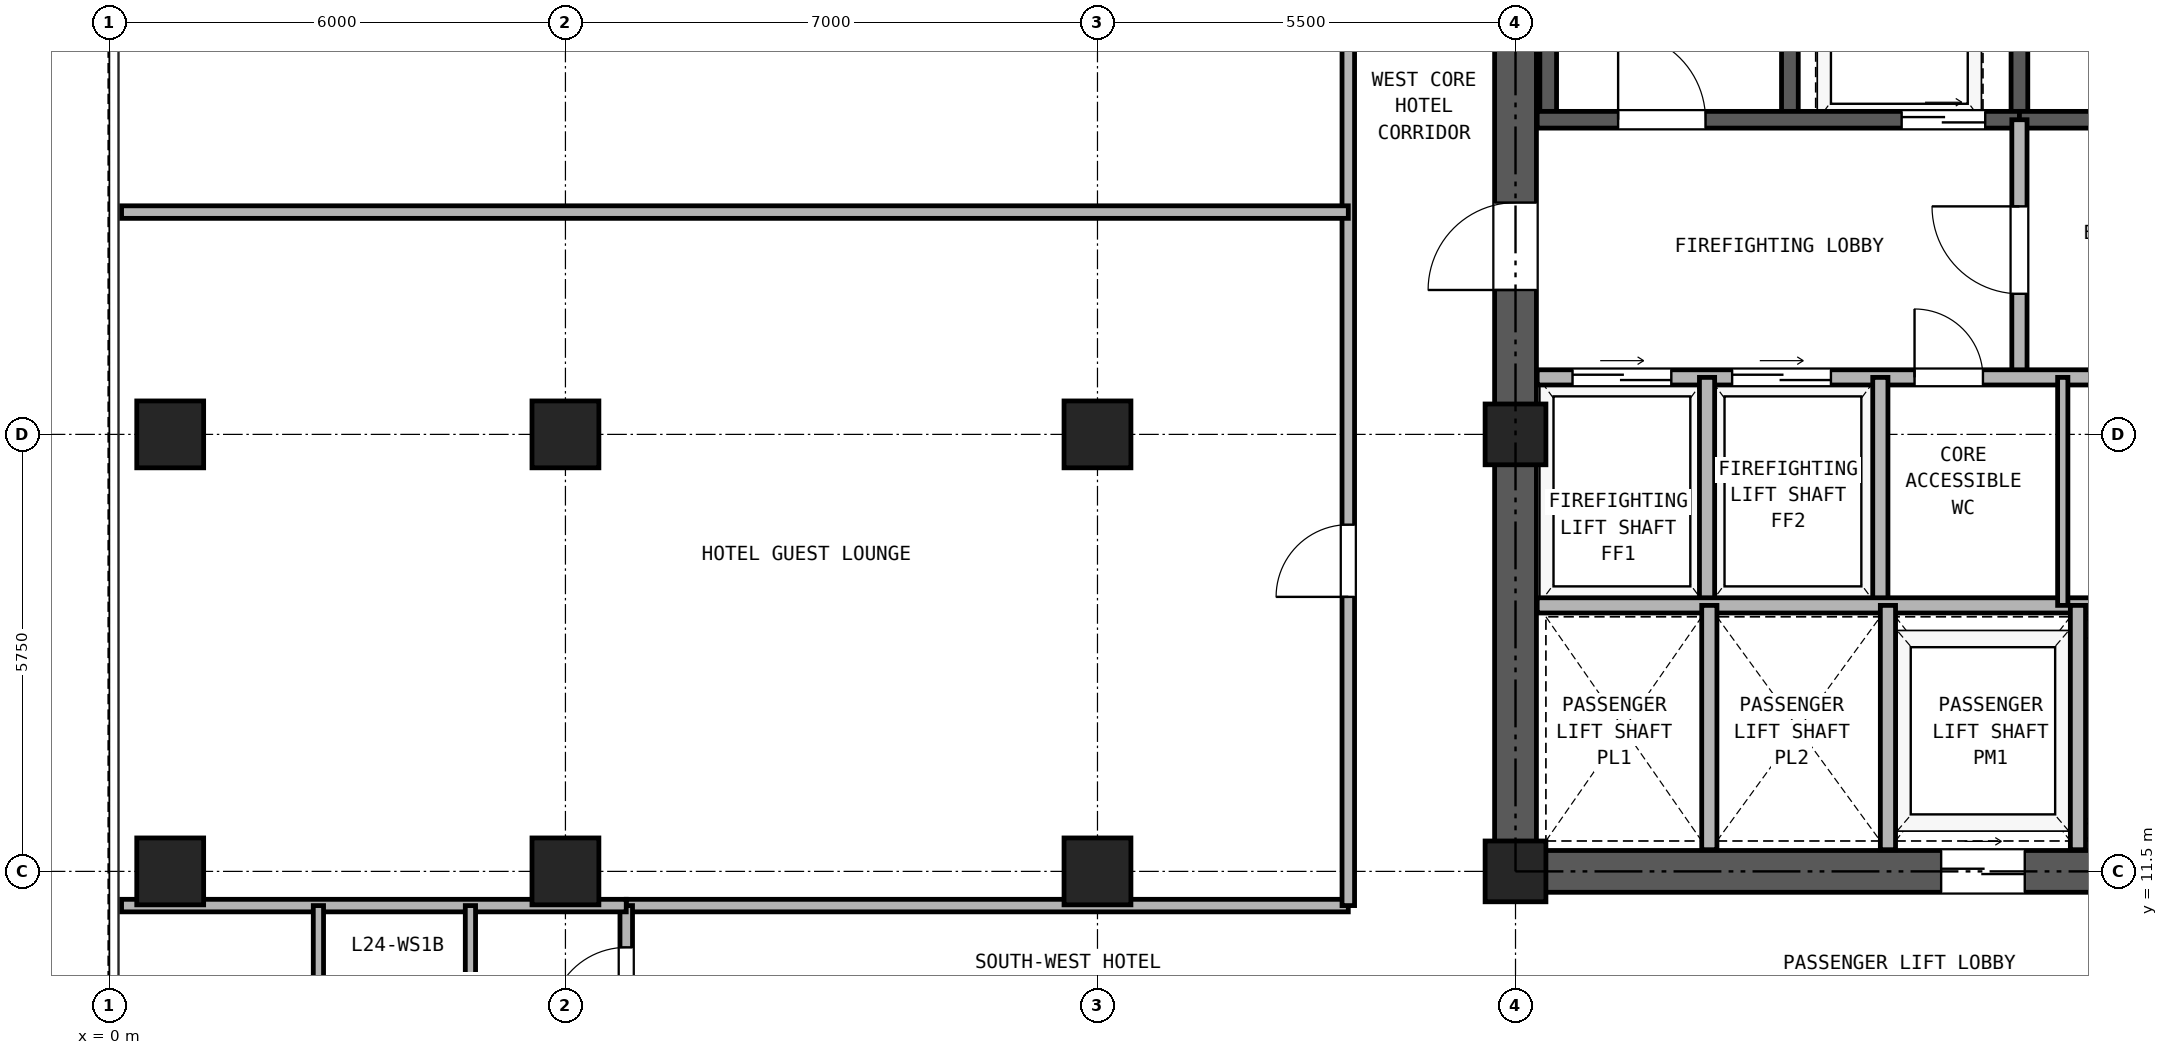
"""IFC4 building model, lengths in metres.
Left out: names, types, materials, properties, quantities, classifications, styles, units other than length and angle.
Written with IfcOpenShell. Run it as: python <this file> out.ifc"""

import sys

from ifc_helpers import new_model, si_unit, direction, frame, frame_2d, origin, origin_2d, place, context, subcontext, project, spatial, rectangle, hollow_rectangle, extrude, source, transform, mapped, element, fill, save


model = new_model("IFC4")
c1 = context("Model", 3, precision=1e-05, world=origin(), true_north=direction((0.0, 1.0)))
c2 = subcontext(c1, "Body", "Model", "MODEL_VIEW")
j1 = project(units=[si_unit("LENGTHUNIT", "METRE"), si_unit("PLANEANGLEUNIT", "RADIAN")], contexts=[c1])
p1 = place(None, origin())
s1 = spatial("IfcSite", under=j1, at=p1, CompositionType="ELEMENT")
p2 = place(p1, origin())
s2 = spatial("IfcBuilding", under=s1, at=p2, CompositionType="ELEMENT")
p3 = place(p2, frame((0.0, 0.0, 92.7)))
s3 = spatial("IfcBuildingStorey", under=s2, at=p3, CompositionType="ELEMENT", Elevation=92.7)
m1 = source(origin(), c2, "Body", "SweptSolid", [
    extrude(hollow_rectangle(XDim=0.88, YDim=0.88, WallThickness=0.05, at=origin_2d()), origin(), (0.0, 0.0, 1.0), 2.95),
])
for number, where, z_axis, x_axis in (
    (1, (0.8, 11.5, 0.0), (0.0, 0.0, 1.0), (1.0, 0.0, 0.0)),
    (2, (0.8, 17.25, 0.0), (0.0, 0.0, 1.0), (1.0, 0.0, 0.0)),
    (3, (6.0, 11.5, 0.0), (0.0, 0.0, 1.0), (1.0, 0.0, 0.0)),
    (4, (6.0, 17.25, 0.0), (0.0, 0.0, 1.0), (1.0, 0.0, 0.0)),
    (5, (13.0, 11.5, 0.0), (0.0, 0.0, 1.0), (1.0, 0.0, 0.0)),
    (6, (13.0, 17.25, 0.0), (0.0, 0.0, 1.0), (1.0, 0.0, 0.0)),
):
    element("IfcColumn", number, at=place(p3, frame(where, z_axis=z_axis, x_axis=x_axis)), inside=s3, PredefinedType="COLUMN", context=c2, shape_type="MappedRepresentation", body=[
        mapped(m1, transform((0.0, 0.0, 0.0), x_axis=(1.0, 0.0, 0.0), y_axis=(0.0, 1.0, 0.0), z_axis=(0.0, 0.0, 1.0), scale=1.0)),
    ])
m2 = source(origin(), c2, "Body", "SweptSolid", [
    extrude(hollow_rectangle(XDim=0.8, YDim=0.8, WallThickness=0.045, at=origin_2d()), origin(), (0.0, 0.0, 1.0), 2.95),
])
for number, where, z_axis, x_axis in (
    (7, (18.5, 11.5, 0.0), (0.0, 0.0, 1.0), (1.0, 0.0, 0.0)),
    (8, (18.5, 17.25, 0.0), (0.0, 0.0, 1.0), (1.0, 0.0, 0.0)),
):
    element("IfcColumn", number, at=place(p3, frame(where, z_axis=z_axis, x_axis=x_axis)), inside=s3, PredefinedType="COLUMN", context=c2, shape_type="MappedRepresentation", body=[
        mapped(m2, transform((0.0, 0.0, 0.0), x_axis=(1.0, 0.0, 0.0), y_axis=(0.0, 1.0, 0.0), z_axis=(0.0, 0.0, 1.0), scale=1.0)),
    ])
p4 = place(p3, frame((18.225, 11.5, 0.0), z_axis=(0.0, 0.0, 1.0), x_axis=(1.0, 0.0, 0.0)))
e9 = element("IfcWall", 9, at=p4, inside=s3, PredefinedType="SHEAR", context=c2, shape_type="SweptSolid", body=[
    extrude(rectangle(XDim=10.55, YDim=0.55, at=frame_2d((5.275, 0.0))), origin(), (0.0, 0.0, 1.0), 2.95),
])
p5 = place(p4, frame((5.875, 0.0, 0.0)))
e10 = element("IfcOpeningElement", 10, at=p5, cuts=e9, PredefinedType="OPENING", context=c2, shape_type="SweptSolid", body=[
    extrude(rectangle(XDim=1.1, YDim=2.25, at=frame_2d((0.55, 1.125))), frame((0.0, 0.285, 0.0), z_axis=(0.0, -1.0, 0.0), x_axis=(1.0, 0.0, 0.0)), (0.0, 0.0, 1.0), 0.57),
])
p6 = place(p4, frame((8.275, 0.0, 0.0)))
e11 = element("IfcOpeningElement", 11, at=p6, cuts=e9, PredefinedType="OPENING", context=c2, shape_type="SweptSolid", body=[
    extrude(rectangle(XDim=1.1, YDim=2.25, at=frame_2d((0.55, 1.125))), frame((0.0, 0.285, 0.0), z_axis=(0.0, -1.0, 0.0), x_axis=(1.0, 0.0, 0.0)), (0.0, 0.0, 1.0), 0.57),
])
p7 = place(p3, frame((18.5, 11.775, 0.0), z_axis=(0.0, 0.0, 1.0), x_axis=(0.0, 1.0, 0.0)))
e12 = element("IfcWall", 12, at=p7, inside=s3, PredefinedType="SHEAR", context=c2, shape_type="SweptSolid", body=[
    extrude(rectangle(XDim=16.7, YDim=0.55, at=frame_2d((8.35, 0.0))), origin(), (0.0, 0.0, 1.0), 2.95),
])
p8 = place(p7, frame((7.375, 0.0, 0.0)))
e13 = element("IfcOpeningElement", 13, at=p8, cuts=e12, PredefinedType="OPENING", context=c2, shape_type="SweptSolid", body=[
    extrude(rectangle(XDim=1.15, YDim=2.2, at=frame_2d((0.575, 1.1))), frame((0.0, 0.285, 0.0), z_axis=(0.0, -1.0, 0.0), x_axis=(1.0, 0.0, 0.0)), (0.0, 0.0, 1.0), 0.57),
])
for number, where, z_axis, x_axis in (
    (14, (18.93, 21.39, 0.0), (0.0, 0.0, 1.0), (0.0, 1.0, 0.0)),
    (15, (22.11, 21.39, 0.0), (0.0, 0.0, 1.0), (0.0, 1.0, 0.0)),
    (16, (25.13, 21.39, 0.0), (0.0, 0.0, 1.0), (0.0, 1.0, 0.0)),
):
    element("IfcWall", number, at=place(p3, frame(where, z_axis=z_axis, x_axis=x_axis)), inside=s3, PredefinedType="SOLIDWALL", context=c2, shape_type="SweptSolid", body=[
        extrude(rectangle(XDim=7.11, YDim=0.22, at=frame_2d((3.555, 0.0))), origin(), (0.0, 0.0, 1.0), 2.95),
    ])
p9 = place(p3, frame((18.785, 21.39, 0.0), z_axis=(0.0, 0.0, 1.0), x_axis=(1.0, 0.0, 0.0)))
e17 = element("IfcWall", 17, at=p9, inside=s3, PredefinedType="SOLIDWALL", context=c2, shape_type="SweptSolid", body=[
    extrude(rectangle(XDim=6.345, YDim=0.22, at=frame_2d((3.172, 0.0))), origin(), (0.0, 0.0, 1.0), 2.95),
])
p10 = place(p9, frame((1.065, 0.0, 0.0)))
e18 = element("IfcOpeningElement", 18, at=p10, cuts=e17, PredefinedType="OPENING", context=c2, shape_type="SweptSolid", body=[
    extrude(rectangle(XDim=1.15, YDim=2.2, at=frame_2d((0.575, 1.1))), frame((0.0, 0.12, 0.0), z_axis=(0.0, -1.0, 0.0), x_axis=(1.0, 0.0, 0.0)), (0.0, 0.0, 1.0), 0.24),
])
p11 = place(p9, frame((4.795, 0.0, 0.0)))
e19 = element("IfcOpeningElement", 19, at=p11, cuts=e17, PredefinedType="OPENING", context=c2, shape_type="SweptSolid", body=[
    extrude(rectangle(XDim=1.1, YDim=2.25, at=frame_2d((0.55, 1.125))), frame((0.0, 0.12, 0.0), z_axis=(0.0, -1.0, 0.0), x_axis=(1.0, 0.0, 0.0)), (0.0, 0.0, 1.0), 0.24),
])
p12 = place(p3, frame((25.13, 21.39, 0.0), z_axis=(0.0, 0.0, 1.0), x_axis=(1.0, 0.0, 0.0)))
e20 = element("IfcWall", 20, at=p12, inside=s3, PredefinedType="SOLIDWALL", context=c2, shape_type="SweptSolid", body=[
    extrude(rectangle(XDim=3.085, YDim=0.22, at=frame_2d((1.542, 0.0))), origin(), (0.0, 0.0, 1.0), 2.95),
])
p13 = place(p12, frame((0.92, 0.0, 0.0)))
e21 = element("IfcOpeningElement", 21, at=p13, cuts=e20, PredefinedType="OPENING", context=c2, shape_type="SweptSolid", body=[
    extrude(rectangle(XDim=1.15, YDim=2.2, at=frame_2d((0.575, 1.1))), frame((0.0, 0.12, 0.0), z_axis=(0.0, -1.0, 0.0), x_axis=(1.0, 0.0, 0.0)), (0.0, 0.0, 1.0), 0.24),
])
p14 = place(p3, frame((25.13, 18.0, 0.0), z_axis=(0.0, 0.0, 1.0), x_axis=(0.0, 1.0, 0.0)))
e22 = element("IfcWall", 22, at=p14, inside=s3, PredefinedType="PARTITIONING", context=c2, shape_type="SweptSolid", body=[
    extrude(rectangle(XDim=3.39, YDim=0.2, at=frame_2d((1.695, 0.0))), origin(), (0.0, 0.0, 1.0), 2.95),
])
p15 = place(p14, frame((1.1, 0.0, 0.0)))
e23 = element("IfcOpeningElement", 23, at=p15, cuts=e22, PredefinedType="OPENING", context=c2, shape_type="SweptSolid", body=[
    extrude(rectangle(XDim=1.15, YDim=2.2, at=frame_2d((0.575, 1.1))), frame((0.0, 0.11, 0.0), z_axis=(0.0, -1.0, 0.0), x_axis=(1.0, 0.0, 0.0)), (0.0, 0.0, 1.0), 0.22),
])
p16 = place(p3, frame((18.785, 18.0, 0.0), z_axis=(0.0, 0.0, 1.0), x_axis=(1.0, 0.0, 0.0)))
e24 = element("IfcWall", 24, at=p16, inside=s3, PredefinedType="PARTITIONING", context=c2, shape_type="SweptSolid", body=[
    extrude(rectangle(XDim=9.43, YDim=0.2, at=frame_2d((4.715, 0.0))), origin(), (0.0, 0.0, 1.0), 2.95),
])
p17 = place(p16, frame((0.465, 0.0, 0.0)))
e25 = element("IfcOpeningElement", 25, at=p17, cuts=e24, PredefinedType="OPENING", context=c2, shape_type="SweptSolid", body=[
    extrude(rectangle(XDim=1.3, YDim=2.3, at=frame_2d((0.65, 1.15))), frame((0.0, 0.11, 0.0), z_axis=(0.0, -1.0, 0.0), x_axis=(1.0, 0.0, 0.0)), (0.0, 0.0, 1.0), 0.22),
])
p18 = place(p16, frame((2.565, 0.0, 0.0)))
e26 = element("IfcOpeningElement", 26, at=p18, cuts=e24, PredefinedType="OPENING", context=c2, shape_type="SweptSolid", body=[
    extrude(rectangle(XDim=1.3, YDim=2.3, at=frame_2d((0.65, 1.15))), frame((0.0, 0.11, 0.0), z_axis=(0.0, -1.0, 0.0), x_axis=(1.0, 0.0, 0.0)), (0.0, 0.0, 1.0), 0.22),
])
p19 = place(p16, frame((4.965, 0.0, 0.0)))
e27 = element("IfcOpeningElement", 27, at=p19, cuts=e24, PredefinedType="OPENING", context=c2, shape_type="SweptSolid", body=[
    extrude(rectangle(XDim=0.9, YDim=2.05, at=frame_2d((0.45, 1.025))), frame((0.0, 0.11, 0.0), z_axis=(0.0, -1.0, 0.0), x_axis=(1.0, 0.0, 0.0)), (0.0, 0.0, 1.0), 0.22),
])
p20 = place(p16, frame((7.665, 0.0, 0.0)))
e28 = element("IfcOpeningElement", 28, at=p20, cuts=e24, PredefinedType="OPENING", context=c2, shape_type="SweptSolid", body=[
    extrude(rectangle(XDim=0.9, YDim=2.05, at=frame_2d((0.45, 1.025))), frame((0.0, 0.11, 0.0), z_axis=(0.0, -1.0, 0.0), x_axis=(1.0, 0.0, 0.0)), (0.0, 0.0, 1.0), 0.22),
])
for number, where, z_axis, x_axis in (
    (29, (21.02, 15.0, 0.0), (0.0, 0.0, 1.0), (0.0, 1.0, 0.0)),
    (30, (23.3, 15.0, 0.0), (0.0, 0.0, 1.0), (0.0, 1.0, 0.0)),
):
    element("IfcWall", number, at=place(p3, frame(where, z_axis=z_axis, x_axis=x_axis)), inside=s3, PredefinedType="PARTITIONING", context=c2, shape_type="SweptSolid", body=[
        extrude(rectangle(XDim=3.0, YDim=0.2, at=frame_2d((1.5, 0.0))), origin(), (0.0, 0.0, 1.0), 2.95),
    ])
p21 = place(p3, frame((18.785, 15.0, 0.0), z_axis=(0.0, 0.0, 1.0), x_axis=(1.0, 0.0, 0.0)))
e31 = element("IfcWall", 31, at=p21, inside=s3, PredefinedType="PARTITIONING", context=c2, shape_type="SweptSolid", body=[
    extrude(rectangle(XDim=9.43, YDim=0.2, at=frame_2d((4.715, 0.0))), origin(), (0.0, 0.0, 1.0), 2.95),
])
p22 = place(p3, frame((25.7, 15.0, 0.0), z_axis=(0.0, 0.0, 1.0), x_axis=(0.0, 1.0, 0.0)))
e32 = element("IfcWall", 32, at=p22, inside=s3, PredefinedType="PARTITIONING", context=c2, shape_type="SweptSolid", body=[
    extrude(rectangle(XDim=3.0, YDim=0.135, at=frame_2d((1.5, 0.0))), origin(), (0.0, 0.0, 1.0), 2.95),
])
for number, where, z_axis, x_axis in (
    (33, (21.05, 11.785, 0.0), (0.0, 0.0, 1.0), (0.0, 1.0, 0.0)),
    (34, (23.4, 11.785, 0.0), (0.0, 0.0, 1.0), (0.0, 1.0, 0.0)),
    (35, (25.9, 11.785, 0.0), (0.0, 0.0, 1.0), (0.0, 1.0, 0.0)),
):
    element("IfcWall", number, at=place(p3, frame(where, z_axis=z_axis, x_axis=x_axis)), inside=s3, PredefinedType="PARTITIONING", context=c2, shape_type="SweptSolid", body=[
        extrude(rectangle(XDim=3.215, YDim=0.2, at=frame_2d((1.607, 0.0))), origin(), (0.0, 0.0, 1.0), 2.95),
    ])
p23 = place(p3, frame((6.8, 11.05, 0.0), z_axis=(0.0, 0.0, 1.0), x_axis=(1.0, 0.0, 0.0)))
e36 = element("IfcWall", 36, at=p23, inside=s3, PredefinedType="PARTITIONING", context=c2, shape_type="SweptSolid", body=[
    extrude(rectangle(XDim=9.5, YDim=0.165, at=frame_2d((4.75, 0.0))), origin(), (0.0, 0.0, 1.0), 2.95),
])
p24 = place(p3, frame((16.3, 11.05, 0.0), z_axis=(0.0, 0.0, 1.0), x_axis=(0.0, 1.0, 0.0)))
e37 = element("IfcWall", 37, at=p24, inside=s3, PredefinedType="PARTITIONING", context=c2, shape_type="SweptSolid", body=[
    extrude(rectangle(XDim=18.25, YDim=0.165, at=frame_2d((9.125, 0.0))), origin(), (0.0, 0.0, 1.0), 2.95),
])
p25 = place(p24, frame((4.062, 0.0, 0.0)))
e38 = element("IfcOpeningElement", 38, at=p25, cuts=e37, PredefinedType="OPENING", context=c2, shape_type="SweptSolid", body=[
    extrude(rectangle(XDim=0.95, YDim=2.15, at=frame_2d((0.475, 1.075))), frame((0.0, 0.093, 0.0), z_axis=(0.0, -1.0, 0.0), x_axis=(1.0, 0.0, 0.0)), (0.0, 0.0, 1.0), 0.185),
])
p26 = place(p24, frame((13.187, 0.0, 0.0)))
e39 = element("IfcOpeningElement", 39, at=p26, cuts=e37, PredefinedType="OPENING", context=c2, shape_type="SweptSolid", body=[
    extrude(rectangle(XDim=0.95, YDim=2.15, at=frame_2d((0.475, 1.075))), frame((0.0, 0.093, 0.0), z_axis=(0.0, -1.0, 0.0), x_axis=(1.0, 0.0, 0.0)), (0.0, 0.0, 1.0), 0.185),
])
p27 = place(p3, frame((6.8, 0.16, 0.0), z_axis=(0.0, 0.0, 1.0), x_axis=(0.0, 1.0, 0.0)))
e40 = element("IfcWall", 40, at=p27, inside=s3, PredefinedType="PARTITIONING", context=c2, shape_type="SweptSolid", body=[
    extrude(rectangle(XDim=10.89, YDim=0.165, at=frame_2d((5.445, 0.0))), origin(), (0.0, 0.0, 1.0), 2.95),
])
p28 = place(p27, frame((9.34, 0.0, 0.0)))
e41 = element("IfcOpeningElement", 41, at=p28, cuts=e40, PredefinedType="OPENING", context=c2, shape_type="SweptSolid", body=[
    extrude(rectangle(XDim=1.0, YDim=2.15, at=frame_2d((0.5, 1.075))), frame((0.0, 0.093, 0.0), z_axis=(0.0, -1.0, 0.0), x_axis=(1.0, 0.0, 0.0)), (0.0, 0.0, 1.0), 0.185),
])
p29 = place(p3, frame((0.16, 11.05, 0.0), z_axis=(0.0, 0.0, 1.0), x_axis=(1.0, 0.0, 0.0)))
e42 = element("IfcWall", 42, at=p29, inside=s3, PredefinedType="PARTITIONING", context=c2, shape_type="SweptSolid", body=[
    extrude(rectangle(XDim=6.64, YDim=0.165, at=frame_2d((3.32, 0.0))), origin(), (0.0, 0.0, 1.0), 2.95),
])
for number, where, z_axis, x_axis in (
    (43, (2.75, 8.95, 0.0), (0.0, 0.0, 1.0), (0.0, 1.0, 0.0)),
    (44, (4.75, 8.95, 0.0), (0.0, 0.0, 1.0), (0.0, 1.0, 0.0)),
):
    element("IfcWall", number, at=place(p3, frame(where, z_axis=z_axis, x_axis=x_axis)), inside=s3, PredefinedType="PARTITIONING", context=c2, shape_type="SweptSolid", body=[
        extrude(rectangle(XDim=2.1, YDim=0.135, at=frame_2d((1.05, 0.0))), origin(), (0.0, 0.0, 1.0), 2.95),
    ])
p30 = place(p3, frame((0.16, 20.175, 0.0), z_axis=(0.0, 0.0, 1.0), x_axis=(1.0, 0.0, 0.0)))
e45 = element("IfcWall", 45, at=p30, inside=s3, PredefinedType="PARTITIONING", context=c2, shape_type="SweptSolid", body=[
    extrude(rectangle(XDim=16.14, YDim=0.165, at=frame_2d((8.07, 0.0))), origin(), (0.0, 0.0, 1.0), 2.583),
])
p31 = place(p10, frame((1.15, 0.0, 0.0), z_axis=(0.0, 0.0, 1.0), x_axis=(-1.0, 0.0, 0.0)))
e46 = element("IfcDoor", 46, at=p31, inside=s3, OperationType="SINGLE_SWING_LEFT", PredefinedType="DOOR", context=c2, shape_type="SweptSolid", body=[
    extrude(rectangle(XDim=1.15, YDim=2.2, at=frame_2d((0.575, 1.1))), frame((0.0, 0.025, 0.0), z_axis=(0.0, -1.0, 0.0), x_axis=(1.0, 0.0, 0.0)), (0.0, 0.0, 1.0), 0.05),
])
fill(e18, e46)
p32 = place(p11, frame((1.1, 0.0, 0.0), z_axis=(0.0, 0.0, 1.0), x_axis=(-1.0, 0.0, 0.0)))
e47 = element("IfcDoor", 47, at=p32, inside=s3, OperationType="DOUBLE_DOOR_SLIDING", PredefinedType="DOOR", context=c2, shape_type="SweptSolid", body=[
    extrude(rectangle(XDim=1.1, YDim=2.25, at=frame_2d((0.55, 1.125))), frame((0.0, 0.025, 0.0), z_axis=(0.0, -1.0, 0.0), x_axis=(1.0, 0.0, 0.0)), (0.0, 0.0, 1.0), 0.05),
])
fill(e19, e47)
p33 = place(p15, origin())
e48 = element("IfcDoor", 48, at=p33, inside=s3, OperationType="SINGLE_SWING_RIGHT", PredefinedType="DOOR", context=c2, shape_type="SweptSolid", body=[
    extrude(rectangle(XDim=1.15, YDim=2.2, at=frame_2d((0.575, 1.1))), frame((0.0, 0.025, 0.0), z_axis=(0.0, -1.0, 0.0), x_axis=(1.0, 0.0, 0.0)), (0.0, 0.0, 1.0), 0.05),
])
fill(e23, e48)
p34 = place(p17, origin())
e49 = element("IfcDoor", 49, at=p34, inside=s3, OperationType="DOUBLE_DOOR_SLIDING", PredefinedType="DOOR", context=c2, shape_type="SweptSolid", body=[
    extrude(rectangle(XDim=1.3, YDim=2.3, at=frame_2d((0.65, 1.15))), frame((0.0, 0.025, 0.0), z_axis=(0.0, -1.0, 0.0), x_axis=(1.0, 0.0, 0.0)), (0.0, 0.0, 1.0), 0.05),
])
fill(e25, e49)
p35 = place(p18, origin())
e50 = element("IfcDoor", 50, at=p35, inside=s3, OperationType="DOUBLE_DOOR_SLIDING", PredefinedType="DOOR", context=c2, shape_type="SweptSolid", body=[
    extrude(rectangle(XDim=1.3, YDim=2.3, at=frame_2d((0.65, 1.15))), frame((0.0, 0.025, 0.0), z_axis=(0.0, -1.0, 0.0), x_axis=(1.0, 0.0, 0.0)), (0.0, 0.0, 1.0), 0.05),
])
fill(e26, e50)
p36 = place(p19, frame((0.9, 0.0, 0.0), z_axis=(0.0, 0.0, 1.0), x_axis=(-1.0, 0.0, 0.0)))
e51 = element("IfcDoor", 51, at=p36, inside=s3, OperationType="SINGLE_SWING_LEFT", PredefinedType="DOOR", context=c2, shape_type="SweptSolid", body=[
    extrude(rectangle(XDim=0.9, YDim=2.05, at=frame_2d((0.45, 1.025))), frame((0.0, 0.025, 0.0), z_axis=(0.0, -1.0, 0.0), x_axis=(1.0, 0.0, 0.0)), (0.0, 0.0, 1.0), 0.05),
])
fill(e27, e51)
p37 = place(p8, frame((1.15, 0.0, 0.0), z_axis=(0.0, 0.0, 1.0), x_axis=(-1.0, 0.0, 0.0)))
e52 = element("IfcDoor", 52, at=p37, inside=s3, OperationType="SINGLE_SWING_LEFT", PredefinedType="DOOR", context=c2, shape_type="SweptSolid", body=[
    extrude(rectangle(XDim=1.15, YDim=2.2, at=frame_2d((0.575, 1.1))), frame((0.0, 0.025, 0.0), z_axis=(0.0, -1.0, 0.0), x_axis=(1.0, 0.0, 0.0)), (0.0, 0.0, 1.0), 0.05),
])
fill(e13, e52)
p38 = place(p5, frame((1.1, 0.0, 0.0), z_axis=(0.0, 0.0, 1.0), x_axis=(-1.0, 0.0, 0.0)))
e53 = element("IfcDoor", 53, at=p38, inside=s3, OperationType="DOUBLE_DOOR_SLIDING", PredefinedType="DOOR", context=c2, shape_type="SweptSolid", body=[
    extrude(rectangle(XDim=1.1, YDim=2.25, at=frame_2d((0.55, 1.125))), frame((0.0, 0.025, 0.0), z_axis=(0.0, -1.0, 0.0), x_axis=(1.0, 0.0, 0.0)), (0.0, 0.0, 1.0), 0.05),
])
fill(e10, e53)
p39 = place(p28, origin())
e54 = element("IfcDoor", 54, at=p39, inside=s3, OperationType="SINGLE_SWING_LEFT", PredefinedType="DOOR", context=c2, shape_type="SweptSolid", body=[
    extrude(rectangle(XDim=1.0, YDim=2.15, at=frame_2d((0.5, 1.075))), frame((0.0, 0.025, 0.0), z_axis=(0.0, -1.0, 0.0), x_axis=(1.0, 0.0, 0.0)), (0.0, 0.0, 1.0), 0.05),
])
fill(e41, e54)
p40 = place(p25, frame((0.95, 0.0, 0.0), z_axis=(0.0, 0.0, 1.0), x_axis=(-1.0, 0.0, 0.0)))
e55 = element("IfcDoor", 55, at=p40, inside=s3, OperationType="SINGLE_SWING_LEFT", PredefinedType="DOOR", context=c2, shape_type="SweptSolid", body=[
    extrude(rectangle(XDim=0.95, YDim=2.15, at=frame_2d((0.475, 1.075))), frame((0.0, 0.025, 0.0), z_axis=(0.0, -1.0, 0.0), x_axis=(1.0, 0.0, 0.0)), (0.0, 0.0, 1.0), 0.05),
])
fill(e38, e55)
save(model, sys.argv[1])
